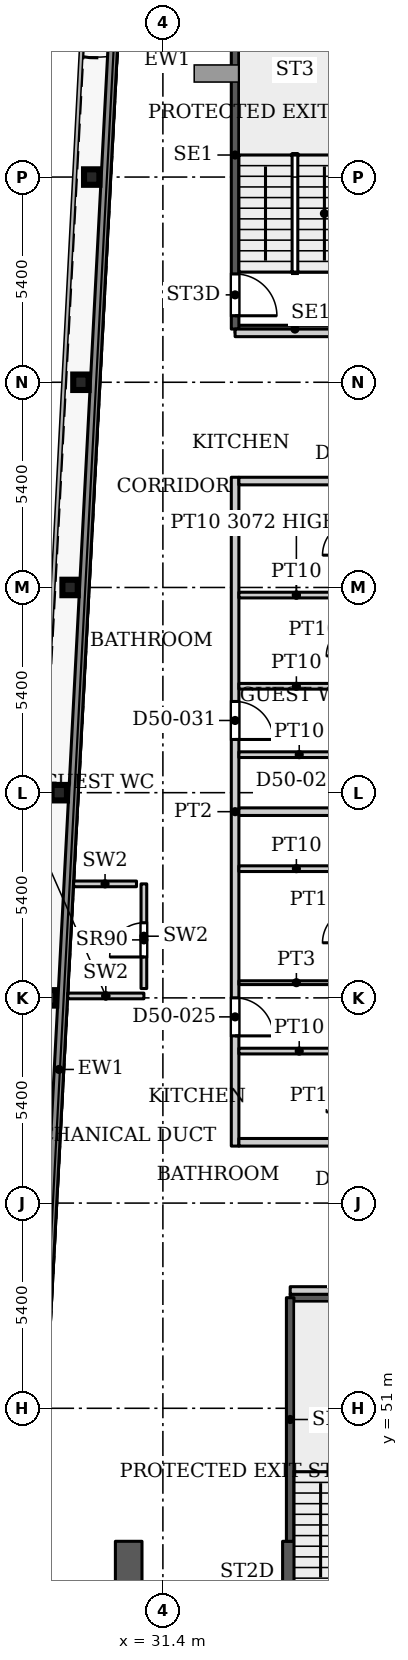
"""IFC4 building model, lengths in metres.
Left out: names, types, materials, properties, quantities, classifications, styles, units other than length and angle.
Written with IfcOpenShell. Run it as: python <this file> out.ifc"""

import sys

from ifc_helpers import new_model, si_unit, direction, frame, frame_2d, origin, origin_2d, place, context, subcontext, project, spatial, rectangle, i_section, extrude, source, transform, mapped, element, fill, save


model = new_model("IFC4")
c1 = context("Model", 3, precision=1e-05, world=origin(), true_north=direction((0.0, 1.0)))
c2 = subcontext(c1, "Body", "Model", "MODEL_VIEW")
j1 = project(units=[si_unit("LENGTHUNIT", "METRE"), si_unit("PLANEANGLEUNIT", "RADIAN")], contexts=[c1])
p1 = place(None, origin())
s1 = spatial("IfcSite", under=j1, at=p1, CompositionType="ELEMENT")
p2 = place(p1, origin())
s2 = spatial("IfcBuilding", under=s1, at=p2, CompositionType="ELEMENT")
p3 = place(p2, frame((0.0, 0.0, 216.2)))
s3 = spatial("IfcBuildingStorey", under=s2, at=p3, CompositionType="ELEMENT", Elevation=216.2)
for number, where, z_axis, x_axis in (
    (1, (28.39, 61.8, 0.0), (0.0, 0.0, 1.0), (1.0, 0.0, 0.0)),
    (2, (28.674, 67.2, 0.0), (0.0, 0.0, 1.0), (1.0, 0.0, 0.0)),
    (3, (28.958, 72.6, 0.0), (0.0, 0.0, 1.0), (1.0, 0.0, 0.0)),
    (4, (29.243, 78.0, 0.0), (0.0, 0.0, 1.0), (1.0, 0.0, 0.0)),
    (5, (29.527, 83.4, 0.0), (0.0, 0.0, 1.0), (1.0, 0.0, 0.0)),
):
    element("IfcColumn", number, at=place(p3, frame(where, z_axis=z_axis, x_axis=x_axis)), inside=s3, PredefinedType="COLUMN", context=c2, shape_type="SweptSolid", body=[
        extrude(i_section(OverallWidth=0.404, OverallDepth=0.407, WebThickness=0.027, FlangeThickness=0.044, FilletRadius=0.012, at=origin_2d()), origin(), (0.0, 0.0, 1.0), 3.9),
    ])
p4 = place(p3, frame((34.75, 29.05, 0.0), z_axis=(0.0, 0.0, 1.0), x_axis=(0.0, 1.0, 0.0)))
e6 = element("IfcWall", 6, at=p4, inside=s3, PredefinedType="SHEAR", context=c2, shape_type="SweptSolid", body=[
    extrude(rectangle(XDim=18.45, YDim=0.4, at=frame_2d((9.225, 0.0))), origin(), (0.0, 0.0, 1.0), 3.9),
])
p5 = place(p4, frame((8.025, 0.0, 0.0)))
e7 = element("IfcOpeningElement", 7, at=p5, cuts=e6, PredefinedType="OPENING", context=c2, shape_type="SweptSolid", body=[
    extrude(rectangle(XDim=1.1, YDim=2.2, at=frame_2d((0.55, 1.1))), frame((0.0, 0.21, 0.0), z_axis=(0.0, -1.0, 0.0), x_axis=(1.0, 0.0, 0.0)), (0.0, 0.0, 1.0), 0.42),
])
p6 = place(p4, frame((10.875, 0.0, 0.0)))
e8 = element("IfcOpeningElement", 8, at=p6, cuts=e6, PredefinedType="OPENING", context=c2, shape_type="SweptSolid", body=[
    extrude(rectangle(XDim=1.1, YDim=2.2, at=frame_2d((0.55, 1.1))), frame((0.0, 0.21, 0.0), z_axis=(0.0, -1.0, 0.0), x_axis=(1.0, 0.0, 0.0)), (0.0, 0.0, 1.0), 0.42),
])
p7 = place(p4, frame((13.725, 0.0, 0.0)))
e9 = element("IfcOpeningElement", 9, at=p7, cuts=e6, PredefinedType="OPENING", context=c2, shape_type="SweptSolid", body=[
    extrude(rectangle(XDim=1.1, YDim=2.2, at=frame_2d((0.55, 1.1))), frame((0.0, 0.21, 0.0), z_axis=(0.0, -1.0, 0.0), x_axis=(1.0, 0.0, 0.0)), (0.0, 0.0, 1.0), 0.42),
])
p8 = place(p4, frame((15.95, 0.0, 0.0)))
e10 = element("IfcOpeningElement", 10, at=p8, cuts=e6, PredefinedType="OPENING", context=c2, shape_type="SweptSolid", body=[
    extrude(rectangle(XDim=1.1, YDim=2.2, at=frame_2d((0.55, 1.1))), frame((0.0, 0.21, 0.0), z_axis=(0.0, -1.0, 0.0), x_axis=(1.0, 0.0, 0.0)), (0.0, 0.0, 1.0), 0.42),
])
p9 = place(p3, frame((30.5, 29.05, 0.0), z_axis=(0.0, 0.0, 1.0), x_axis=(0.0, 1.0, 0.0)))
e11 = element("IfcWall", 11, at=p9, inside=s3, PredefinedType="SHEAR", context=c2, shape_type="SweptSolid", body=[
    extrude(rectangle(XDim=18.45, YDim=0.7, at=frame_2d((9.225, 0.0))), origin(), (0.0, 0.0, 1.0), 3.9),
])
p10 = place(p9, frame((6.21, 0.0, 0.0)))
e12 = element("IfcOpeningElement", 12, at=p10, cuts=e11, PredefinedType="OPENING", context=c2, shape_type="SweptSolid", body=[
    extrude(rectangle(XDim=0.9, YDim=2.2, at=frame_2d((0.45, 1.1))), frame((0.0, 0.36, 0.0), z_axis=(0.0, -1.0, 0.0), x_axis=(1.0, 0.0, 0.0)), (0.0, 0.0, 1.0), 0.72),
])
p11 = place(p9, frame((10.684, 0.0, 0.0)))
e13 = element("IfcOpeningElement", 13, at=p11, cuts=e11, PredefinedType="OPENING", context=c2, shape_type="SweptSolid", body=[
    extrude(rectangle(XDim=0.9, YDim=2.2, at=frame_2d((0.45, 1.1))), frame((0.0, 0.36, 0.0), z_axis=(0.0, -1.0, 0.0), x_axis=(1.0, 0.0, 0.0)), (0.0, 0.0, 1.0), 0.72),
])
p12 = place(p3, frame((27.195, 31.969, 0.0), z_axis=(0.0, 0.0, 1.0), x_axis=(0.052559748861, 0.998617781135, 0.0)))
e14 = element("IfcWall", 14, at=p12, inside=s3, PredefinedType="SOLIDWALL", context=c2, shape_type="SweptSolid", body=[
    extrude(rectangle(XDim=55.972, YDim=0.25, at=frame_2d((27.986, 0.0))), origin(), (0.0, 0.0, 1.0), 3.75),
])
p13 = place(p3, frame((34.75, 53.91, 0.0), z_axis=(0.0, 0.0, 1.0), x_axis=(1.0, 0.0, 0.0)))
e15 = element("IfcWall", 15, at=p13, inside=s3, PredefinedType="SHEAR", context=c2, shape_type="SweptSolid", body=[
    extrude(rectangle(XDim=3.15, YDim=0.2, at=frame_2d((1.575, 0.0))), origin(), (0.0, 0.0, 1.0), 3.9),
])
p14 = place(p3, frame((34.75, 47.5, 0.0), z_axis=(0.0, 0.0, 1.0), x_axis=(0.0, 1.0, 0.0)))
e16 = element("IfcWall", 16, at=p14, inside=s3, PredefinedType="SHEAR", context=c2, shape_type="SweptSolid", body=[
    extrude(rectangle(XDim=6.41, YDim=0.2, at=frame_2d((3.205, 0.0))), origin(), (0.0, 0.0, 1.0), 3.9),
])
p15 = place(p3, frame((33.3, 79.4, 0.0), z_axis=(0.0, 0.0, 1.0), x_axis=(1.0, 0.0, 0.0)))
e17 = element("IfcWall", 17, at=p15, inside=s3, PredefinedType="SHEAR", context=c2, shape_type="SweptSolid", body=[
    extrude(rectangle(XDim=3.15, YDim=0.2, at=frame_2d((1.575, 0.0))), origin(), (0.0, 0.0, 1.0), 3.9),
])
p16 = place(p3, frame((33.3, 79.4, 0.0), z_axis=(0.0, 0.0, 1.0), x_axis=(0.0, 1.0, 0.0)))
e18 = element("IfcWall", 18, at=p16, inside=s3, PredefinedType="SHEAR", context=c2, shape_type="SweptSolid", body=[
    extrude(rectangle(XDim=9.16, YDim=0.2, at=frame_2d((4.58, 0.0))), origin(), (0.0, 0.0, 1.0), 3.9),
])
p17 = place(p16, frame((0.35, 0.0, 0.0)))
e19 = element("IfcOpeningElement", 19, at=p17, cuts=e18, PredefinedType="OPENING", context=c2, shape_type="SweptSolid", body=[
    extrude(rectangle(XDim=1.1, YDim=2.2, at=frame_2d((0.55, 1.1))), frame((0.0, 0.11, 0.0), z_axis=(0.0, -1.0, 0.0), x_axis=(1.0, 0.0, 0.0)), (0.0, 0.0, 1.0), 0.22),
])
p18 = place(p3, frame((28.896, 61.851, 0.0), z_axis=(0.0, 0.0, 1.0), x_axis=(1.0, 0.0, 0.0)))
e20 = element("IfcWall", 20, at=p18, inside=s3, PredefinedType="PARTITIONING", context=c2, shape_type="SweptSolid", body=[
    extrude(rectangle(XDim=2.004, YDim=0.15, at=frame_2d((1.002, 0.0))), origin(), (0.0, 0.0, 1.0), 3.072),
])
p19 = place(p3, frame((30.9, 62.046, 0.0), z_axis=(0.0, 0.0, 1.0), x_axis=(0.0, 1.0, 0.0)))
e21 = element("IfcWall", 21, at=p19, inside=s3, PredefinedType="PARTITIONING", context=c2, shape_type="SweptSolid", body=[
    extrude(rectangle(XDim=2.754, YDim=0.15, at=frame_2d((1.377, 0.0))), origin(), (0.0, 0.0, 1.0), 3.9),
])
p20 = place(p19, frame((0.83, 0.0, 0.0)))
e22 = element("IfcOpeningElement", 22, at=p20, cuts=e21, PredefinedType="OPENING", context=c2, shape_type="SweptSolid", body=[
    extrude(rectangle(XDim=0.9, YDim=2.2, at=frame_2d((0.45, 1.1))), frame((0.0, 0.085, 0.0), z_axis=(0.0, -1.0, 0.0), x_axis=(1.0, 0.0, 0.0)), (0.0, 0.0, 1.0), 0.17),
])
p21 = place(p3, frame((29.051, 64.8, 0.0), z_axis=(0.0, 0.0, 1.0), x_axis=(1.0, 0.0, 0.0)))
e23 = element("IfcWall", 23, at=p21, inside=s3, PredefinedType="PARTITIONING", context=c2, shape_type="SweptSolid", body=[
    extrude(rectangle(XDim=1.654, YDim=0.15, at=frame_2d((0.827, 0.0))), origin(), (0.0, 0.0, 1.0), 3.9),
])
p22 = place(p3, frame((33.3, 57.9, 0.0), z_axis=(0.0, 0.0, 1.0), x_axis=(0.0, 1.0, 0.0)))
e24 = element("IfcWall", 24, at=p22, inside=s3, PredefinedType="PARTITIONING", context=c2, shape_type="SweptSolid", body=[
    extrude(rectangle(XDim=17.6, YDim=0.2, at=frame_2d((8.8, 0.0))), origin(), (0.0, 0.0, 1.0), 3.6),
])
p23 = place(p22, frame((2.9, 0.0, 0.0)))
e25 = element("IfcOpeningElement", 25, at=p23, cuts=e24, PredefinedType="OPENING", context=c2, shape_type="SweptSolid", body=[
    extrude(rectangle(XDim=1.0, YDim=2.1, at=frame_2d((0.5, 1.05))), frame((0.0, 0.11, 0.0), z_axis=(0.0, -1.0, 0.0), x_axis=(1.0, 0.0, 0.0)), (0.0, 0.0, 1.0), 0.22),
])
p24 = place(p22, frame((10.7, 0.0, 0.0)))
e26 = element("IfcOpeningElement", 26, at=p24, cuts=e24, PredefinedType="OPENING", context=c2, shape_type="SweptSolid", body=[
    extrude(rectangle(XDim=1.0, YDim=2.1, at=frame_2d((0.5, 1.05))), frame((0.0, 0.11, 0.0), z_axis=(0.0, -1.0, 0.0), x_axis=(1.0, 0.0, 0.0)), (0.0, 0.0, 1.0), 0.22),
])
p25 = place(p3, frame((33.3, 79.3, 0.0), z_axis=(0.0, 0.0, 1.0), x_axis=(1.0, 0.0, 0.0)))
e27 = element("IfcWall", 27, at=p25, inside=s3, PredefinedType="PARTITIONING", context=c2, shape_type="SweptSolid", body=[
    extrude(rectangle(XDim=12.6, YDim=0.2, at=frame_2d((6.3, 0.0))), origin(), (0.0, 0.0, 1.0), 3.6),
])
p26 = place(p25, frame((5.795, 0.0, 0.0)))
e28 = element("IfcOpeningElement", 28, at=p26, cuts=e27, PredefinedType="OPENING", context=c2, shape_type="SweptSolid", body=[
    extrude(rectangle(XDim=1.0, YDim=2.1, at=frame_2d((0.5, 1.05))), frame((0.0, 0.11, 0.0), z_axis=(0.0, -1.0, 0.0), x_axis=(1.0, 0.0, 0.0)), (0.0, 0.0, 1.0), 0.22),
])
p27 = place(p3, frame((33.4, 58.0, 0.0), z_axis=(0.0, 0.0, 1.0), x_axis=(1.0, 0.0, 0.0)))
e29 = element("IfcWall", 29, at=p27, inside=s3, PredefinedType="PARTITIONING", context=c2, shape_type="SweptSolid", body=[
    extrude(rectangle(XDim=12.5, YDim=0.2, at=frame_2d((6.25, 0.0))), origin(), (0.0, 0.0, 1.0), 3.6),
])
p28 = place(p3, frame((33.4, 60.4, 0.0), z_axis=(0.0, 0.0, 1.0), x_axis=(1.0, 0.0, 0.0)))
e30 = element("IfcWall", 30, at=p28, inside=s3, PredefinedType="PARTITIONING", context=c2, shape_type="SweptSolid", body=[
    extrude(rectangle(XDim=3.175, YDim=0.15, at=frame_2d((1.587, 0.0))), origin(), (0.0, 0.0, 1.0), 3.6),
])
p29 = place(p3, frame((33.4, 62.2, 0.0), z_axis=(0.0, 0.0, 1.0), x_axis=(1.0, 0.0, 0.0)))
e31 = element("IfcWall", 31, at=p29, inside=s3, PredefinedType="PARTITIONING", context=c2, shape_type="SweptSolid", body=[
    extrude(rectangle(XDim=3.025, YDim=0.1, at=frame_2d((1.513, 0.0))), origin(), (0.0, 0.0, 1.0), 3.6),
])
p30 = place(p3, frame((33.4, 65.2, 0.0), z_axis=(0.0, 0.0, 1.0), x_axis=(1.0, 0.0, 0.0)))
e32 = element("IfcWall", 32, at=p30, inside=s3, PredefinedType="PARTITIONING", context=c2, shape_type="SweptSolid", body=[
    extrude(rectangle(XDim=3.025, YDim=0.15, at=frame_2d((1.513, 0.0))), origin(), (0.0, 0.0, 1.0), 3.6),
])
p31 = place(p3, frame((33.4, 66.7, 0.0), z_axis=(0.0, 0.0, 1.0), x_axis=(1.0, 0.0, 0.0)))
e33 = element("IfcWall", 33, at=p31, inside=s3, PredefinedType="PARTITIONING", context=c2, shape_type="SweptSolid", body=[
    extrude(rectangle(XDim=12.5, YDim=0.2, at=frame_2d((6.25, 0.0))), origin(), (0.0, 0.0, 1.0), 3.6),
])
p32 = place(p3, frame((33.4, 68.2, 0.0), z_axis=(0.0, 0.0, 1.0), x_axis=(1.0, 0.0, 0.0)))
e34 = element("IfcWall", 34, at=p32, inside=s3, PredefinedType="PARTITIONING", context=c2, shape_type="SweptSolid", body=[
    extrude(rectangle(XDim=3.175, YDim=0.15, at=frame_2d((1.587, 0.0))), origin(), (0.0, 0.0, 1.0), 3.6),
])
p33 = place(p3, frame((33.4, 70.0, 0.0), z_axis=(0.0, 0.0, 1.0), x_axis=(1.0, 0.0, 0.0)))
e35 = element("IfcWall", 35, at=p33, inside=s3, PredefinedType="PARTITIONING", context=c2, shape_type="SweptSolid", body=[
    extrude(rectangle(XDim=3.025, YDim=0.15, at=frame_2d((1.513, 0.0))), origin(), (0.0, 0.0, 1.0), 3.6),
])
p34 = place(p3, frame((33.4, 72.4, 0.0), z_axis=(0.0, 0.0, 1.0), x_axis=(1.0, 0.0, 0.0)))
e36 = element("IfcWall", 36, at=p34, inside=s3, PredefinedType="PARTITIONING", context=c2, shape_type="SweptSolid", body=[
    extrude(rectangle(XDim=3.025, YDim=0.15, at=frame_2d((1.513, 0.0))), origin(), (0.0, 0.0, 1.0), 3.072),
])
p35 = place(p3, frame((33.4, 75.4, 0.0), z_axis=(0.0, 0.0, 1.0), x_axis=(1.0, 0.0, 0.0)))
e37 = element("IfcWall", 37, at=p35, inside=s3, PredefinedType="PARTITIONING", context=c2, shape_type="SweptSolid", body=[
    extrude(rectangle(XDim=12.5, YDim=0.2, at=frame_2d((6.25, 0.0))), origin(), (0.0, 0.0, 1.0), 3.6),
])
p36 = place(p3, frame((34.75, 54.1, 0.0), z_axis=(0.0, 0.0, 1.0), x_axis=(1.0, 0.0, 0.0)))
e38 = element("IfcWall", 38, at=p36, inside=s3, PredefinedType="PARTITIONING", context=c2, shape_type="SweptSolid", body=[
    extrude(rectangle(XDim=11.15, YDim=0.2, at=frame_2d((5.575, 0.0))), origin(), (0.0, 0.0, 1.0), 3.6),
])
p37 = place(p36, frame((5.075, 0.0, 0.0)))
e39 = element("IfcOpeningElement", 39, at=p37, cuts=e38, PredefinedType="OPENING", context=c2, shape_type="SweptSolid", body=[
    extrude(rectangle(XDim=1.0, YDim=2.1, at=frame_2d((0.5, 1.05))), frame((0.0, 0.11, 0.0), z_axis=(0.0, -1.0, 0.0), x_axis=(1.0, 0.0, 0.0)), (0.0, 0.0, 1.0), 0.22),
])
m1 = source(origin(), c2, "Body", "SweptSolid", [
    extrude(rectangle(XDim=0.9, YDim=2.2, at=frame_2d((0.45, 1.1))), frame((0.0, 0.025, 0.0), z_axis=(0.0, -1.0, 0.0), x_axis=(1.0, 0.0, 0.0)), (0.0, 0.0, 1.0), 0.05),
])
p38 = place(p20, origin())
e40 = element("IfcDoor", 40, at=p38, inside=s3, OperationType="SINGLE_SWING_LEFT", PredefinedType="DOOR", context=c2, shape_type="MappedRepresentation", body=[
    mapped(m1, transform((0.0, 0.0, 0.0), x_axis=(1.0, 0.0, 0.0), y_axis=(0.0, 1.0, 0.0), z_axis=(0.0, 0.0, 1.0), scale=1.0)),
])
fill(e22, e40)
m2 = source(origin(), c2, "Body", "SweptSolid", [
    extrude(rectangle(XDim=1.1, YDim=2.2, at=frame_2d((0.55, 1.1))), frame((0.0, 0.025, 0.0), z_axis=(0.0, -1.0, 0.0), x_axis=(1.0, 0.0, 0.0)), (0.0, 0.0, 1.0), 0.05),
])
p39 = place(p17, origin())
e41 = element("IfcDoor", 41, at=p39, inside=s3, OperationType="SINGLE_SWING_RIGHT", PredefinedType="DOOR", context=c2, shape_type="MappedRepresentation", body=[
    mapped(m2, transform((0.0, 0.0, 0.0), x_axis=(1.0, 0.0, 0.0), y_axis=(0.0, 1.0, 0.0), z_axis=(0.0, 0.0, 1.0), scale=1.0)),
])
fill(e19, e41)
m3 = source(origin(), c2, "Body", "SweptSolid", [
    extrude(rectangle(XDim=1.0, YDim=2.1, at=frame_2d((0.5, 1.05))), frame((0.0, 0.025, 0.0), z_axis=(0.0, -1.0, 0.0), x_axis=(1.0, 0.0, 0.0)), (0.0, 0.0, 1.0), 0.05),
])
p40 = place(p23, origin())
e42 = element("IfcDoor", 42, at=p40, inside=s3, OperationType="SINGLE_SWING_RIGHT", PredefinedType="DOOR", context=c2, shape_type="MappedRepresentation", body=[
    mapped(m3, transform((0.0, 0.0, 0.0), x_axis=(1.0, 0.0, 0.0), y_axis=(0.0, 1.0, 0.0), z_axis=(0.0, 0.0, 1.0), scale=1.0)),
])
fill(e25, e42)
p41 = place(p24, origin())
e43 = element("IfcDoor", 43, at=p41, inside=s3, OperationType="SINGLE_SWING_RIGHT", PredefinedType="DOOR", context=c2, shape_type="MappedRepresentation", body=[
    mapped(m3, transform((0.0, 0.0, 0.0), x_axis=(1.0, 0.0, 0.0), y_axis=(0.0, 1.0, 0.0), z_axis=(0.0, 0.0, 1.0), scale=1.0)),
])
fill(e26, e43)
save(model, sys.argv[1])
